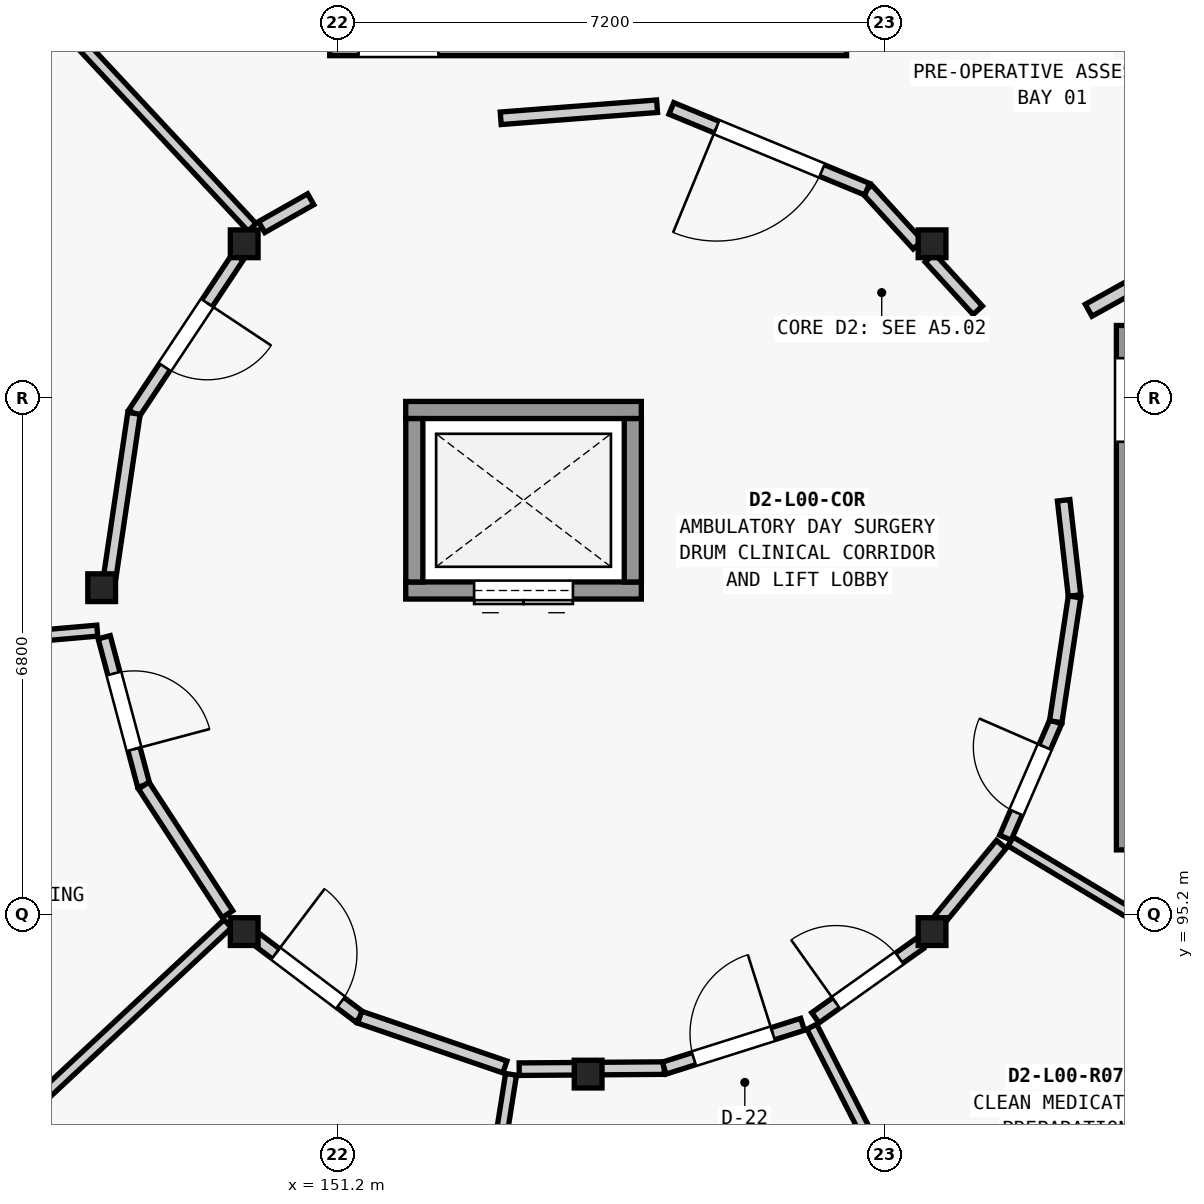
"""IFC4 building model, lengths in metres.
Left out: names, types, materials, properties, quantities, classifications, styles, units other than length and angle.
Written with IfcOpenShell. Run it as: python <this file> out.ifc"""

import sys

from ifc_helpers import new_model, si_unit, direction, frame, frame_2d, origin, origin_2d, place, context, subcontext, project, spatial, rectangle, extrude, element, fill, save


model = new_model("IFC4")
c1 = context("Model", 3, precision=1e-05, world=origin(), true_north=direction((0.0, 1.0)))
c2 = subcontext(c1, "Body", "Model", "MODEL_VIEW")
j1 = project(units=[si_unit("LENGTHUNIT", "METRE"), si_unit("PLANEANGLEUNIT", "RADIAN")], contexts=[c1])
p1 = place(None, origin())
s1 = spatial("IfcSite", under=j1, at=p1, CompositionType="ELEMENT")
p2 = place(p1, origin())
s2 = spatial("IfcBuilding", under=s1, at=p2, CompositionType="ELEMENT")
p3 = place(p2, origin())
s3 = spatial("IfcBuildingStorey", under=s2, at=p3, CompositionType="ELEMENT", Elevation=0.0)
for number, where, z_axis, x_axis in (
    (1, (159.025, 104.025, 0.0), (0.0, 0.0, 1.0), (1.0, 0.0, 0.0)),
    (2, (149.975, 104.025, 0.0), (0.0, 0.0, 1.0), (1.0, 0.0, 0.0)),
    (3, (148.1, 99.5, 0.0), (0.0, 0.0, 1.0), (1.0, 0.0, 0.0)),
    (4, (149.975, 94.975, 0.0), (0.0, 0.0, 1.0), (1.0, 0.0, 0.0)),
    (5, (154.5, 93.1, 0.0), (0.0, 0.0, 1.0), (1.0, 0.0, 0.0)),
    (6, (159.025, 94.975, 0.0), (0.0, 0.0, 1.0), (1.0, 0.0, 0.0)),
):
    element("IfcColumn", number, at=place(p3, frame(where, z_axis=z_axis, x_axis=x_axis)), inside=s3, PredefinedType="COLUMN", context=c2, shape_type="SweptSolid", body=[
        extrude(rectangle(XDim=0.365, YDim=0.365, at=origin_2d()), origin(), (0.0, 0.0, 1.0), 4.55),
    ])
p4 = place(p3, frame((161.575, 102.95, 0.0), z_axis=(0.0, 0.0, 1.0), x_axis=(0.0, -1.0, 0.0)))
e7 = element("IfcWall", 7, at=p4, inside=s3, PredefinedType="SHEAR", context=c2, shape_type="SweptSolid", body=[
    extrude(rectangle(XDim=6.9, YDim=0.25, at=frame_2d((3.45, 0.0))), origin(), (0.0, 0.0, 1.0), 4.305),
])
p5 = place(p4, frame((0.43, 0.0, 0.0)))
e8 = element("IfcOpeningElement", 8, at=p5, cuts=e7, PredefinedType="OPENING", context=c2, shape_type="SweptSolid", body=[
    extrude(rectangle(XDim=1.1, YDim=2.15, at=frame_2d((0.55, 1.075))), frame((0.0, 0.135, 0.0), z_axis=(0.0, -1.0, 0.0), x_axis=(1.0, 0.0, 0.0)), (0.0, 0.0, 1.0), 0.27),
])
p6 = place(p3, frame((151.1, 106.6, 0.0), z_axis=(0.0, 0.0, 1.0), x_axis=(1.0, 0.0, 0.0)))
e9 = element("IfcWall", 9, at=p6, inside=s3, PredefinedType="SHEAR", context=c2, shape_type="SweptSolid", body=[
    extrude(rectangle(XDim=6.8, YDim=0.2, at=frame_2d((3.4, 0.0))), origin(), (0.0, 0.0, 1.0), 4.305),
])
p7 = place(p6, frame((0.38, 0.0, 0.0)))
e10 = element("IfcOpeningElement", 10, at=p7, cuts=e9, PredefinedType="OPENING", context=c2, shape_type="SweptSolid", body=[
    extrude(rectangle(XDim=1.05, YDim=2.15, at=frame_2d((0.525, 1.075))), frame((0.0, 0.11, 0.0), z_axis=(0.0, -1.0, 0.0), x_axis=(1.0, 0.0, 0.0)), (0.0, 0.0, 1.0), 0.22),
])
p8 = place(p3, frame((152.1, 99.463, 0.0), z_axis=(0.0, 0.0, 1.0), x_axis=(1.0, 0.0, 0.0)))
e11 = element("IfcWall", 11, at=p8, inside=s3, PredefinedType="SHEAR", context=c2, shape_type="SweptSolid", body=[
    extrude(rectangle(XDim=3.1, YDim=0.225, at=frame_2d((1.55, 0.0))), origin(), (0.0, 0.0, 1.0), 4.305),
])
p9 = place(p8, frame((0.9, 0.0, 0.0)))
e12 = element("IfcOpeningElement", 12, at=p9, cuts=e11, PredefinedType="OPENING", context=c2, shape_type="SweptSolid", body=[
    extrude(rectangle(XDim=1.3, YDim=2.2, at=frame_2d((0.65, 1.1))), frame((0.0, 0.123, 0.0), z_axis=(0.0, -1.0, 0.0), x_axis=(1.0, 0.0, 0.0)), (0.0, 0.0, 1.0), 0.245),
])
p10 = place(p3, frame((152.1, 101.838, 0.0), z_axis=(0.0, 0.0, 1.0), x_axis=(1.0, 0.0, 0.0)))
e13 = element("IfcWall", 13, at=p10, inside=s3, PredefinedType="SHEAR", context=c2, shape_type="SweptSolid", body=[
    extrude(rectangle(XDim=3.1, YDim=0.225, at=frame_2d((1.55, 0.0))), origin(), (0.0, 0.0, 1.0), 4.305),
])
for number, where, z_axis, x_axis in (
    (14, (152.213, 99.575, 0.0), (0.0, 0.0, 1.0), (0.0, 1.0, 0.0)),
    (15, (155.088, 99.575, 0.0), (0.0, 0.0, 1.0), (0.0, 1.0, 0.0)),
):
    element("IfcWall", number, at=place(p3, frame(where, z_axis=z_axis, x_axis=x_axis)), inside=s3, PredefinedType="SHEAR", context=c2, shape_type="SweptSolid", body=[
        extrude(rectangle(XDim=2.15, YDim=0.225, at=frame_2d((1.075, 0.0))), origin(), (0.0, 0.0, 1.0), 4.305),
    ])
p11 = place(p3, frame((161.085, 103.15, 0.0), z_axis=(0.0, 0.0, 1.0), x_axis=(0.874618676917, 0.484811478813, 0.0)))
e16 = element("IfcWall", 16, at=p11, inside=s3, PredefinedType="PARTITIONING", context=c2, shape_type="SweptSolid", body=[
    extrude(rectangle(XDim=4.214, YDim=0.18, at=frame_2d((2.107, 0.0))), origin(), (0.0, 0.0, 1.0), 3.634),
])
p12 = place(p3, frame((150.079, 104.241, 0.0), z_axis=(0.0, 0.0, 1.0), x_axis=(-0.681975712302, 0.731374820342, 0.0)))
e17 = element("IfcWall", 17, at=p12, inside=s3, PredefinedType="PARTITIONING", context=c2, shape_type="SweptSolid", body=[
    extrude(rectangle(XDim=5.283, YDim=0.145, at=frame_2d((2.642, 0.0))), origin(), (0.0, 0.0, 1.0), 3.634),
])
p13 = place(p3, frame((148.042, 98.935, 0.0), z_axis=(0.0, 0.0, 1.0), x_axis=(-0.996201824445, -0.087074249763, 0.0)))
e18 = element("IfcWall", 18, at=p13, inside=s3, PredefinedType="PARTITIONING", context=c2, shape_type="SweptSolid", body=[
    extrude(rectangle(XDim=5.26, YDim=0.145, at=frame_2d((2.63, 0.0))), origin(), (0.0, 0.0, 1.0), 3.634),
])
p14 = place(p3, frame((149.759, 95.079, 0.0), z_axis=(0.0, 0.0, 1.0), x_axis=(-0.731374820342, -0.681975712302, 0.0)))
e19 = element("IfcWall", 19, at=p14, inside=s3, PredefinedType="PARTITIONING", context=c2, shape_type="SweptSolid", body=[
    extrude(rectangle(XDim=5.283, YDim=0.145, at=frame_2d((2.642, 0.0))), origin(), (0.0, 0.0, 1.0), 3.634),
])
p15 = place(p3, frame((153.486, 93.097, 0.0), z_axis=(0.0, 0.0, 1.0), x_axis=(-0.156475439167, -0.98768185006, 0.0)))
e20 = element("IfcWall", 20, at=p15, inside=s3, PredefinedType="PARTITIONING", context=c2, shape_type="SweptSolid", body=[
    extrude(rectangle(XDim=5.28, YDim=0.145, at=frame_2d((2.64, 0.0))), origin(), (0.0, 0.0, 1.0), 3.634),
])
p16 = place(p3, frame((157.443, 93.724, 0.0), z_axis=(0.0, 0.0, 1.0), x_axis=(0.454011967175, -0.890995585658, 0.0)))
e21 = element("IfcWall", 21, at=p16, inside=s3, PredefinedType="PARTITIONING", context=c2, shape_type="SweptSolid", body=[
    extrude(rectangle(XDim=5.262, YDim=0.145, at=frame_2d((2.631, 0.0))), origin(), (0.0, 0.0, 1.0), 3.634),
])
p17 = place(p3, frame((160.057, 96.161, 0.0), z_axis=(0.0, 0.0, 1.0), x_axis=(0.857171289871, -0.515031435761, 0.0)))
e22 = element("IfcWall", 22, at=p17, inside=s3, PredefinedType="PLUMBINGWALL", context=c2, shape_type="SweptSolid", body=[
    extrude(rectangle(XDim=4.423, YDim=0.135, at=frame_2d((2.211, 0.0))), origin(), (0.0, 0.0, 1.0), 3.634),
])
p18 = place(p3, frame((159.626, 103.15, 0.0), z_axis=(0.0, 0.0, 1.0), x_axis=(-0.674102073733, 0.738638202497, 0.0)))
e23 = element("IfcWall", 23, at=p18, inside=s3, PredefinedType="PARTITIONING", context=c2, shape_type="SweptSolid", body=[
    extrude(rectangle(XDim=0.934, YDim=0.165, at=frame_2d((0.467, 0.0))), origin(), (0.0, 0.0, 1.0), 3.634),
])
p19 = place(p3, frame((158.838, 104.013, 0.0), z_axis=(0.0, 0.0, 1.0), x_axis=(-0.674538621486, 0.738239560118, 0.0)))
e24 = element("IfcWall", 24, at=p19, inside=s3, PredefinedType="PARTITIONING", context=c2, shape_type="SweptSolid", body=[
    extrude(rectangle(XDim=0.989, YDim=0.165, at=frame_2d((0.494, 0.0))), origin(), (0.0, 0.0, 1.0), 3.634),
])
p20 = place(p3, frame((158.171, 104.743, 0.0), z_axis=(0.0, 0.0, 1.0), x_axis=(-0.924385702607, 0.381459136494, 0.0)))
e25 = element("IfcWall", 25, at=p20, inside=s3, PredefinedType="PARTITIONING", context=c2, shape_type="SweptSolid", body=[
    extrude(rectangle(XDim=2.787, YDim=0.165, at=frame_2d((1.393, 0.0))), origin(), (0.0, 0.0, 1.0), 3.634),
])
p21 = place(p20, frame((0.643, 0.0, 0.0)))
e26 = element("IfcOpeningElement", 26, at=p21, cuts=e25, PredefinedType="OPENING", context=c2, shape_type="SweptSolid", body=[
    extrude(rectangle(XDim=1.5, YDim=2.3, at=frame_2d((0.75, 1.15))), frame((0.0, 0.093, 0.0), z_axis=(0.0, -1.0, 0.0), x_axis=(1.0, 0.0, 0.0)), (0.0, 0.0, 1.0), 0.185),
])
p22 = place(p3, frame((155.407, 105.835, 0.0), z_axis=(0.0, 0.0, 1.0), x_axis=(-0.99702797337, -0.077040381088, 0.0)))
e27 = element("IfcWall", 27, at=p22, inside=s3, PredefinedType="PARTITIONING", context=c2, shape_type="SweptSolid", body=[
    extrude(rectangle(XDim=2.063, YDim=0.165, at=frame_2d((1.031, 0.0))), origin(), (0.0, 0.0, 1.0), 3.634),
])
p23 = place(p3, frame((150.85, 104.611, 0.0), z_axis=(0.0, 0.0, 1.0), x_axis=(-0.869758476347, -0.493477651796, 0.0)))
e28 = element("IfcWall", 28, at=p23, inside=s3, PredefinedType="PARTITIONING", context=c2, shape_type="SweptSolid", body=[
    extrude(rectangle(XDim=0.742, YDim=0.165, at=frame_2d((0.371, 0.0))), origin(), (0.0, 0.0, 1.0), 3.634),
])
p24 = place(p3, frame((149.894, 103.856, 0.0), z_axis=(0.0, 0.0, 1.0), x_axis=(-0.553151407961, -0.833080740307, 0.0)))
e29 = element("IfcWall", 29, at=p24, inside=s3, PredefinedType="PARTITIONING", context=c2, shape_type="SweptSolid", body=[
    extrude(rectangle(XDim=2.475, YDim=0.165, at=frame_2d((1.238, 0.0))), origin(), (0.0, 0.0, 1.0), 3.634),
])
p25 = place(p24, frame((0.733, 0.0, 0.0)))
e30 = element("IfcOpeningElement", 30, at=p25, cuts=e29, PredefinedType="OPENING", context=c2, shape_type="SweptSolid", body=[
    extrude(rectangle(XDim=1.01, YDim=2.15, at=frame_2d((0.505, 1.075))), frame((0.0, 0.093, 0.0), z_axis=(0.0, -1.0, 0.0), x_axis=(1.0, 0.0, 0.0)), (0.0, 0.0, 1.0), 0.185),
])
p26 = place(p3, frame((148.525, 101.794, 0.0), z_axis=(0.0, 0.0, 1.0), x_axis=(-0.146426008628, -0.989221625318, 0.0)))
e31 = element("IfcWall", 31, at=p26, inside=s3, PredefinedType="PARTITIONING", context=c2, shape_type="SweptSolid", body=[
    extrude(rectangle(XDim=2.164, YDim=0.165, at=frame_2d((1.082, 0.0))), origin(), (0.0, 0.0, 1.0), 3.634),
])
p27 = place(p3, frame((148.133, 98.848, 0.0), z_axis=(0.0, 0.0, 1.0), x_axis=(0.257557284001, -0.966263031197, 0.0)))
e32 = element("IfcWall", 32, at=p27, inside=s3, PredefinedType="PARTITIONING", context=c2, shape_type="SweptSolid", body=[
    extrude(rectangle(XDim=2.019, YDim=0.165, at=frame_2d((1.01, 0.0))), origin(), (0.0, 0.0, 1.0), 3.634),
])
p28 = place(p27, frame((0.494, 0.0, 0.0)))
e33 = element("IfcOpeningElement", 33, at=p28, cuts=e32, PredefinedType="OPENING", context=c2, shape_type="SweptSolid", body=[
    extrude(rectangle(XDim=1.03, YDim=2.18, at=frame_2d((0.515, 1.09))), frame((0.0, 0.093, 0.0), z_axis=(0.0, -1.0, 0.0), x_axis=(1.0, 0.0, 0.0)), (0.0, 0.0, 1.0), 0.185),
])
p29 = place(p3, frame((148.653, 96.897, 0.0), z_axis=(0.0, 0.0, 1.0), x_axis=(0.545710691365, -0.83797365193, 0.0)))
e34 = element("IfcWall", 34, at=p29, inside=s3, PredefinedType="PARTITIONING", context=c2, shape_type="SweptSolid", body=[
    extrude(rectangle(XDim=2.019, YDim=0.165, at=frame_2d((1.01, 0.0))), origin(), (0.0, 0.0, 1.0), 3.634),
])
p30 = place(p3, frame((150.135, 94.877, 0.0), z_axis=(0.0, 0.0, 1.0), x_axis=(0.797812216317, -0.602906018792, 0.0)))
e35 = element("IfcWall", 35, at=p30, inside=s3, PredefinedType="PARTITIONING", context=c2, shape_type="SweptSolid", body=[
    extrude(rectangle(XDim=1.705, YDim=0.165, at=frame_2d((0.853, 0.0))), origin(), (0.0, 0.0, 1.0), 3.634),
])
p31 = place(p30, frame((0.318, 0.0, 0.0)))
e36 = element("IfcOpeningElement", 36, at=p31, cuts=e35, PredefinedType="OPENING", context=c2, shape_type="SweptSolid", body=[
    extrude(rectangle(XDim=1.07, YDim=2.2, at=frame_2d((0.535, 1.1))), frame((0.0, 0.093, 0.0), z_axis=(0.0, -1.0, 0.0), x_axis=(1.0, 0.0, 0.0)), (0.0, 0.0, 1.0), 0.185),
])
p32 = place(p3, frame((151.495, 93.849, 0.0), z_axis=(0.0, 0.0, 1.0), x_axis=(0.94591520518, -0.324413971046, 0.0)))
e37 = element("IfcWall", 37, at=p32, inside=s3, PredefinedType="PARTITIONING", context=c2, shape_type="SweptSolid", body=[
    extrude(rectangle(XDim=2.019, YDim=0.165, at=frame_2d((1.01, 0.0))), origin(), (0.0, 0.0, 1.0), 3.634),
])
p33 = place(p3, frame((153.593, 93.165, 0.0), z_axis=(0.0, 0.0, 1.0), x_axis=(0.999977808117, 0.006662077336, 0.0)))
e38 = element("IfcWall", 38, at=p33, inside=s3, PredefinedType="PARTITIONING", context=c2, shape_type="SweptSolid", body=[
    extrude(rectangle(XDim=0.733, YDim=0.165, at=frame_2d((0.366, 0.0))), origin(), (0.0, 0.0, 1.0), 3.634),
])
p34 = place(p3, frame((154.673, 93.173, 0.0), z_axis=(0.0, 0.0, 1.0), x_axis=(0.999974955026, 0.007077380985, 0.0)))
e39 = element("IfcWall", 39, at=p34, inside=s3, PredefinedType="PARTITIONING", context=c2, shape_type="SweptSolid", body=[
    extrude(rectangle(XDim=0.828, YDim=0.165, at=frame_2d((0.414, 0.0))), origin(), (0.0, 0.0, 1.0), 3.634),
])
p35 = place(p3, frame((155.501, 93.179, 0.0), z_axis=(0.0, 0.0, 1.0), x_axis=(0.953406615916, 0.30168829067, 0.0)))
e40 = element("IfcWall", 40, at=p35, inside=s3, PredefinedType="PARTITIONING", context=c2, shape_type="SweptSolid", body=[
    extrude(rectangle(XDim=1.909, YDim=0.165, at=frame_2d((0.955, 0.0))), origin(), (0.0, 0.0, 1.0), 3.634),
])
p36 = place(p35, frame((0.409, 0.0, 0.0)))
e41 = element("IfcOpeningElement", 41, at=p36, cuts=e40, PredefinedType="OPENING", context=c2, shape_type="SweptSolid", body=[
    extrude(rectangle(XDim=1.09, YDim=2.22, at=frame_2d((0.545, 1.11))), frame((0.0, 0.093, 0.0), z_axis=(0.0, -1.0, 0.0), x_axis=(1.0, 0.0, 0.0)), (0.0, 0.0, 1.0), 0.185),
])
p37 = place(p3, frame((157.49, 93.841, 0.0), z_axis=(0.0, 0.0, 1.0), x_axis=(0.814885465769, 0.579622012761, 0.0)))
e42 = element("IfcWall", 42, at=p37, inside=s3, PredefinedType="PARTITIONING", context=c2, shape_type="SweptSolid", body=[
    extrude(rectangle(XDim=1.687, YDim=0.165, at=frame_2d((0.844, 0.0))), origin(), (0.0, 0.0, 1.0), 3.634),
])
p38 = place(p37, frame((0.334, 0.0, 0.0)))
e43 = element("IfcOpeningElement", 43, at=p38, cuts=e42, PredefinedType="OPENING", context=c2, shape_type="SweptSolid", body=[
    extrude(rectangle(XDim=1.02, YDim=2.2, at=frame_2d((0.51, 1.1))), frame((0.0, 0.093, 0.0), z_axis=(0.0, -1.0, 0.0), x_axis=(1.0, 0.0, 0.0)), (0.0, 0.0, 1.0), 0.185),
])
p39 = place(p3, frame((159.124, 95.134, 0.0), z_axis=(0.0, 0.0, 1.0), x_axis=(0.634556320129, 0.772876624426, 0.0)))
e44 = element("IfcWall", 44, at=p39, inside=s3, PredefinedType="PARTITIONING", context=c2, shape_type="SweptSolid", body=[
    extrude(rectangle(XDim=1.28, YDim=0.165, at=frame_2d((0.64, 0.0))), origin(), (0.0, 0.0, 1.0), 3.634),
])
p40 = place(p3, frame((159.99, 96.211, 0.0), z_axis=(0.0, 0.0, 1.0), x_axis=(0.398221343375, 0.917289355482, 0.0)))
e45 = element("IfcWall", 45, at=p40, inside=s3, PredefinedType="PARTITIONING", context=c2, shape_type="SweptSolid", body=[
    extrude(rectangle(XDim=1.663, YDim=0.165, at=frame_2d((0.831, 0.0))), origin(), (0.0, 0.0, 1.0), 3.634),
])
p41 = place(p40, frame((0.361, 0.0, 0.0)))
e46 = element("IfcOpeningElement", 46, at=p41, cuts=e45, PredefinedType="OPENING", context=c2, shape_type="SweptSolid", body=[
    extrude(rectangle(XDim=0.94, YDim=2.1, at=frame_2d((0.47, 1.05))), frame((0.0, 0.093, 0.0), z_axis=(0.0, -1.0, 0.0), x_axis=(1.0, 0.0, 0.0)), (0.0, 0.0, 1.0), 0.185),
])
p42 = place(p3, frame((160.652, 97.736, 0.0), z_axis=(0.0, 0.0, 1.0), x_axis=(0.148577598489, 0.98890075196, 0.0)))
e47 = element("IfcWall", 47, at=p42, inside=s3, PredefinedType="PARTITIONING", context=c2, shape_type="SweptSolid", body=[
    extrude(rectangle(XDim=1.661, YDim=0.165, at=frame_2d((0.831, 0.0))), origin(), (0.0, 0.0, 1.0), 3.634),
])
p43 = place(p3, frame((160.899, 99.397, 0.0), z_axis=(0.0, 0.0, 1.0), x_axis=(-0.113257197306, 0.993565703544, 0.0)))
e48 = element("IfcWall", 48, at=p43, inside=s3, PredefinedType="PARTITIONING", context=c2, shape_type="SweptSolid", body=[
    extrude(rectangle(XDim=1.261, YDim=0.165, at=frame_2d((0.63, 0.0))), origin(), (0.0, 0.0, 1.0), 3.634),
])
p44 = place(p5, origin())
e49 = element("IfcDoor", 49, at=p44, inside=s3, OperationType="SINGLE_SWING_RIGHT", PredefinedType="DOOR", context=c2, shape_type="SweptSolid", body=[
    extrude(rectangle(XDim=1.1, YDim=2.15, at=frame_2d((0.55, 1.075))), frame((0.0, 0.025, 0.0), z_axis=(0.0, -1.0, 0.0), x_axis=(1.0, 0.0, 0.0)), (0.0, 0.0, 1.0), 0.05),
])
fill(e8, e49)
p45 = place(p9, origin())
e50 = element("IfcDoor", 50, at=p45, inside=s3, OperationType="DOUBLE_DOOR_SLIDING", PredefinedType="DOOR", context=c2, shape_type="SweptSolid", body=[
    extrude(rectangle(XDim=1.3, YDim=2.2, at=frame_2d((0.65, 1.1))), frame((0.0, 0.025, 0.0), z_axis=(0.0, -1.0, 0.0), x_axis=(1.0, 0.0, 0.0)), (0.0, 0.0, 1.0), 0.05),
])
fill(e12, e50)
p46 = place(p21, origin())
e51 = element("IfcDoor", 51, at=p46, inside=s3, OperationType="SINGLE_SWING_RIGHT", PredefinedType="DOOR", context=c2, shape_type="SweptSolid", body=[
    extrude(rectangle(XDim=1.5, YDim=2.3, at=frame_2d((0.75, 1.15))), frame((0.0, 0.025, 0.0), z_axis=(0.0, -1.0, 0.0), x_axis=(1.0, 0.0, 0.0)), (0.0, 0.0, 1.0), 0.05),
])
fill(e26, e51)
p47 = place(p25, origin())
e52 = element("IfcDoor", 52, at=p47, inside=s3, OperationType="SINGLE_SWING_LEFT", PredefinedType="DOOR", context=c2, shape_type="SweptSolid", body=[
    extrude(rectangle(XDim=1.01, YDim=2.15, at=frame_2d((0.505, 1.075))), frame((0.0, 0.025, 0.0), z_axis=(0.0, -1.0, 0.0), x_axis=(1.0, 0.0, 0.0)), (0.0, 0.0, 1.0), 0.05),
])
fill(e30, e52)
p48 = place(p28, origin())
e53 = element("IfcDoor", 53, at=p48, inside=s3, OperationType="SINGLE_SWING_RIGHT", PredefinedType="DOOR", context=c2, shape_type="SweptSolid", body=[
    extrude(rectangle(XDim=1.03, YDim=2.18, at=frame_2d((0.515, 1.09))), frame((0.0, 0.025, 0.0), z_axis=(0.0, -1.0, 0.0), x_axis=(1.0, 0.0, 0.0)), (0.0, 0.0, 1.0), 0.05),
])
fill(e33, e53)
p49 = place(p31, origin())
e54 = element("IfcDoor", 54, at=p49, inside=s3, OperationType="SINGLE_SWING_LEFT", PredefinedType="DOOR", context=c2, shape_type="SweptSolid", body=[
    extrude(rectangle(XDim=1.07, YDim=2.2, at=frame_2d((0.535, 1.1))), frame((0.0, 0.025, 0.0), z_axis=(0.0, -1.0, 0.0), x_axis=(1.0, 0.0, 0.0)), (0.0, 0.0, 1.0), 0.05),
])
fill(e36, e54)
p50 = place(p36, origin())
e55 = element("IfcDoor", 55, at=p50, inside=s3, OperationType="SINGLE_SWING_RIGHT", PredefinedType="DOOR", context=c2, shape_type="SweptSolid", body=[
    extrude(rectangle(XDim=1.09, YDim=2.22, at=frame_2d((0.545, 1.11))), frame((0.0, 0.025, 0.0), z_axis=(0.0, -1.0, 0.0), x_axis=(1.0, 0.0, 0.0)), (0.0, 0.0, 1.0), 0.05),
])
fill(e41, e55)
p51 = place(p38, origin())
e56 = element("IfcDoor", 56, at=p51, inside=s3, OperationType="SINGLE_SWING_LEFT", PredefinedType="DOOR", context=c2, shape_type="SweptSolid", body=[
    extrude(rectangle(XDim=1.02, YDim=2.2, at=frame_2d((0.51, 1.1))), frame((0.0, 0.025, 0.0), z_axis=(0.0, -1.0, 0.0), x_axis=(1.0, 0.0, 0.0)), (0.0, 0.0, 1.0), 0.05),
])
fill(e43, e56)
p52 = place(p41, origin())
e57 = element("IfcDoor", 57, at=p52, inside=s3, OperationType="SINGLE_SWING_RIGHT", PredefinedType="DOOR", context=c2, shape_type="SweptSolid", body=[
    extrude(rectangle(XDim=0.94, YDim=2.1, at=frame_2d((0.47, 1.05))), frame((0.0, 0.025, 0.0), z_axis=(0.0, -1.0, 0.0), x_axis=(1.0, 0.0, 0.0)), (0.0, 0.0, 1.0), 0.05),
])
fill(e46, e57)
save(model, sys.argv[1])
